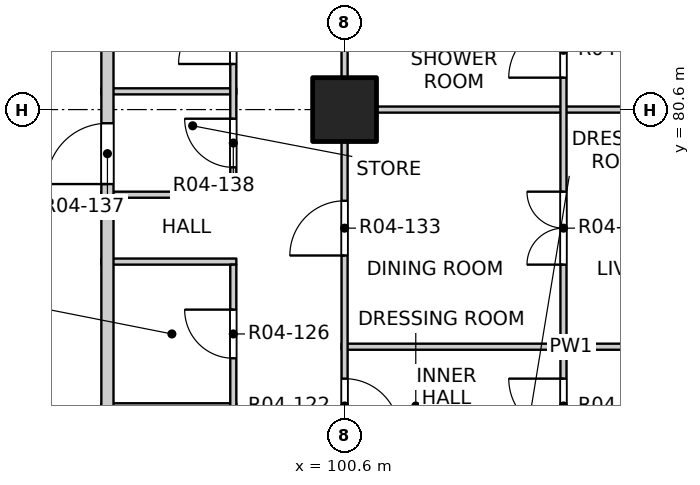
"""IFC4 building model, lengths in metres.
Left out: names, types, materials, properties, quantities, classifications, styles, units other than length and angle.
Written with IfcOpenShell. Run it as: python <this file> out.ifc"""

import sys

from ifc_helpers import new_model, si_unit, direction, frame, frame_2d, origin, origin_2d, place, context, subcontext, project, spatial, rectangle, extrude, element, fill, save


model = new_model("IFC4")
c1 = context("Model", 3, precision=1e-05, world=origin(), true_north=direction((0.0, 1.0)))
c2 = subcontext(c1, "Body", "Model", "MODEL_VIEW")
j1 = project(units=[si_unit("LENGTHUNIT", "METRE"), si_unit("PLANEANGLEUNIT", "RADIAN")], contexts=[c1])
p1 = place(None, origin())
s1 = spatial("IfcSite", under=j1, at=p1, CompositionType="ELEMENT")
p2 = place(p1, origin())
s2 = spatial("IfcBuilding", under=s1, at=p2, CompositionType="ELEMENT")
p3 = place(p2, frame((0.0, 0.0, 58.0)))
s3 = spatial("IfcBuildingStorey", under=s2, at=p3, CompositionType="ELEMENT", Elevation=58.0)
p4 = place(p3, frame((100.6, 80.6, -0.25), z_axis=(0.0, 0.0, 1.0), x_axis=(1.0, 0.0, 0.0)))
e1 = element("IfcColumn", 1, at=p4, inside=s3, PredefinedType="COLUMN", context=c2, shape_type="SweptSolid", body=[
    extrude(rectangle(XDim=1.05, YDim=1.05, at=origin_2d()), origin(), (0.0, 0.0, 1.0), 3.4),
])
p5 = place(p3, frame((96.6, 75.72, 0.0), z_axis=(0.0, 0.0, 1.0), x_axis=(1.0, 0.0, 0.0)))
e2 = element("IfcWall", 2, at=p5, inside=s3, PredefinedType="PARTITIONING", context=c2, shape_type="SweptSolid", body=[
    extrude(rectangle(XDim=2.22, YDim=0.1, at=frame_2d((1.11, 0.0))), origin(), (0.0, 0.0, 1.0), 3.15),
])
p6 = place(p3, frame((100.55, 76.7, 0.0), z_axis=(0.0, 0.0, 1.0), x_axis=(1.0, 0.0, 0.0)))
e3 = element("IfcWall", 3, at=p6, inside=s3, PredefinedType="PARTITIONING", context=c2, shape_type="SweptSolid", body=[
    extrude(rectangle(XDim=7.55, YDim=0.1, at=frame_2d((3.775, 0.0))), origin(), (0.0, 0.0, 1.0), 3.15),
])
for number, where, z_axis, x_axis in (
    (4, (96.6, 78.1, 0.0), (0.0, 0.0, 1.0), (1.0, 0.0, 0.0)),
    (5, (96.6, 79.2, 0.0), (0.0, 0.0, 1.0), (1.0, 0.0, 0.0)),
):
    element("IfcWall", number, at=place(p3, frame(where, z_axis=z_axis, x_axis=x_axis)), inside=s3, PredefinedType="PARTITIONING", context=c2, shape_type="SweptSolid", body=[
        extrude(rectangle(XDim=2.22, YDim=0.1, at=frame_2d((1.11, 0.0))), origin(), (0.0, 0.0, 1.0), 3.15),
    ])
p7 = place(p3, frame((100.55, 80.6, 0.0), z_axis=(0.0, 0.0, 1.0), x_axis=(1.0, 0.0, 0.0)))
e6 = element("IfcWall", 6, at=p7, inside=s3, PredefinedType="PARTITIONING", context=c2, shape_type="SweptSolid", body=[
    extrude(rectangle(XDim=7.55, YDim=0.1, at=frame_2d((3.775, 0.0))), origin(), (0.0, 0.0, 1.0), 2.55),
])
p8 = place(p3, frame((96.6, 80.9, 0.0), z_axis=(0.0, 0.0, 1.0), x_axis=(1.0, 0.0, 0.0)))
e7 = element("IfcWall", 7, at=p8, inside=s3, PredefinedType="PARTITIONING", context=c2, shape_type="SweptSolid", body=[
    extrude(rectangle(XDim=2.22, YDim=0.1, at=frame_2d((1.11, 0.0))), origin(), (0.0, 0.0, 1.0), 3.15),
])
p9 = place(p3, frame((96.7, 53.4, 0.0), z_axis=(0.0, 0.0, 1.0), x_axis=(0.0, 1.0, 0.0)))
e8 = element("IfcWall", 8, at=p9, inside=s3, PredefinedType="PARTITIONING", context=c2, shape_type="SweptSolid", body=[
    extrude(rectangle(XDim=31.0, YDim=0.2, at=frame_2d((15.5, 0.0))), origin(), (0.0, 0.0, 1.0), 3.15),
])
p10 = place(p9, frame((3.525, 0.0, 0.0)))
e9 = element("IfcOpeningElement", 9, at=p10, cuts=e8, PredefinedType="OPENING", context=c2, shape_type="SweptSolid", body=[
    extrude(rectangle(XDim=1.0, YDim=2.1, at=frame_2d((0.5, 1.05))), frame((0.0, 0.11, 0.0), z_axis=(0.0, -1.0, 0.0), x_axis=(1.0, 0.0, 0.0)), (0.0, 0.0, 1.0), 0.22),
])
p11 = place(p9, frame((10.825, 0.0, 0.0)))
e10 = element("IfcOpeningElement", 10, at=p11, cuts=e8, PredefinedType="OPENING", context=c2, shape_type="SweptSolid", body=[
    extrude(rectangle(XDim=1.0, YDim=2.1, at=frame_2d((0.5, 1.05))), frame((0.0, 0.11, 0.0), z_axis=(0.0, -1.0, 0.0), x_axis=(1.0, 0.0, 0.0)), (0.0, 0.0, 1.0), 0.22),
])
p12 = place(p9, frame((25.975, 0.0, 0.0)))
e11 = element("IfcOpeningElement", 11, at=p12, cuts=e8, PredefinedType="OPENING", context=c2, shape_type="SweptSolid", body=[
    extrude(rectangle(XDim=1.0, YDim=2.1, at=frame_2d((0.5, 1.05))), frame((0.0, 0.11, 0.0), z_axis=(0.0, -1.0, 0.0), x_axis=(1.0, 0.0, 0.0)), (0.0, 0.0, 1.0), 0.22),
])
p13 = place(p3, frame((98.77, 64.1, 0.0), z_axis=(0.0, 0.0, 1.0), x_axis=(0.0, 1.0, 0.0)))
e12 = element("IfcWall", 12, at=p13, inside=s3, PredefinedType="PARTITIONING", context=c2, shape_type="SweptSolid", body=[
    extrude(rectangle(XDim=13.95, YDim=0.1, at=frame_2d((6.975, 0.0))), origin(), (0.0, 0.0, 1.0), 3.15),
])
p14 = place(p13, frame((1.185, 0.0, 0.0)))
e13 = element("IfcOpeningElement", 13, at=p14, cuts=e12, PredefinedType="OPENING", context=c2, shape_type="SweptSolid", body=[
    extrude(rectangle(XDim=0.9, YDim=2.1, at=frame_2d((0.45, 1.05))), frame((0.0, 0.06, 0.0), z_axis=(0.0, -1.0, 0.0), x_axis=(1.0, 0.0, 0.0)), (0.0, 0.0, 1.0), 0.12),
])
p15 = place(p13, frame((4.07, 0.0, 0.0)))
e14 = element("IfcOpeningElement", 14, at=p15, cuts=e12, PredefinedType="OPENING", context=c2, shape_type="SweptSolid", body=[
    extrude(rectangle(XDim=0.9, YDim=2.1, at=frame_2d((0.45, 1.05))), frame((0.0, 0.06, 0.0), z_axis=(0.0, -1.0, 0.0), x_axis=(1.0, 0.0, 0.0)), (0.0, 0.0, 1.0), 0.12),
])
p16 = place(p13, frame((6.81, 0.0, 0.0)))
e15 = element("IfcOpeningElement", 15, at=p16, cuts=e12, PredefinedType="OPENING", context=c2, shape_type="SweptSolid", body=[
    extrude(rectangle(XDim=0.8, YDim=2.1, at=frame_2d((0.4, 1.05))), frame((0.0, 0.06, 0.0), z_axis=(0.0, -1.0, 0.0), x_axis=(1.0, 0.0, 0.0)), (0.0, 0.0, 1.0), 0.12),
])
p17 = place(p13, frame((9.71, 0.0, 0.0)))
e16 = element("IfcOpeningElement", 16, at=p17, cuts=e12, PredefinedType="OPENING", context=c2, shape_type="SweptSolid", body=[
    extrude(rectangle(XDim=0.9, YDim=2.1, at=frame_2d((0.45, 1.05))), frame((0.0, 0.06, 0.0), z_axis=(0.0, -1.0, 0.0), x_axis=(1.0, 0.0, 0.0)), (0.0, 0.0, 1.0), 0.12),
])
p18 = place(p13, frame((12.41, 0.0, 0.0)))
e17 = element("IfcOpeningElement", 17, at=p18, cuts=e12, PredefinedType="OPENING", context=c2, shape_type="SweptSolid", body=[
    extrude(rectangle(XDim=0.8, YDim=2.1, at=frame_2d((0.4, 1.05))), frame((0.0, 0.06, 0.0), z_axis=(0.0, -1.0, 0.0), x_axis=(1.0, 0.0, 0.0)), (0.0, 0.0, 1.0), 0.12),
])
p19 = place(p3, frame((98.77, 79.25, 0.0), z_axis=(0.0, 0.0, 1.0), x_axis=(0.0, 1.0, 0.0)))
e18 = element("IfcWall", 18, at=p19, inside=s3, PredefinedType="PARTITIONING", context=c2, shape_type="SweptSolid", body=[
    extrude(rectangle(XDim=5.2, YDim=0.1, at=frame_2d((2.6, 0.0))), origin(), (0.0, 0.0, 1.0), 3.15),
])
p20 = place(p19, frame((0.4, 0.0, 0.0)))
e19 = element("IfcOpeningElement", 19, at=p20, cuts=e18, PredefinedType="OPENING", context=c2, shape_type="SweptSolid", body=[
    extrude(rectangle(XDim=0.8, YDim=2.1, at=frame_2d((0.4, 1.05))), frame((0.0, 0.06, 0.0), z_axis=(0.0, -1.0, 0.0), x_axis=(1.0, 0.0, 0.0)), (0.0, 0.0, 1.0), 0.12),
])
p21 = place(p19, frame((2.1, 0.0, 0.0)))
e20 = element("IfcOpeningElement", 20, at=p21, cuts=e18, PredefinedType="OPENING", context=c2, shape_type="SweptSolid", body=[
    extrude(rectangle(XDim=0.9, YDim=2.1, at=frame_2d((0.45, 1.05))), frame((0.0, 0.06, 0.0), z_axis=(0.0, -1.0, 0.0), x_axis=(1.0, 0.0, 0.0)), (0.0, 0.0, 1.0), 0.12),
])
p22 = place(p19, frame((3.9, 0.0, 0.0)))
e21 = element("IfcOpeningElement", 21, at=p22, cuts=e18, PredefinedType="OPENING", context=c2, shape_type="SweptSolid", body=[
    extrude(rectangle(XDim=0.9, YDim=2.1, at=frame_2d((0.45, 1.05))), frame((0.0, 0.06, 0.0), z_axis=(0.0, -1.0, 0.0), x_axis=(1.0, 0.0, 0.0)), (0.0, 0.0, 1.0), 0.12),
])
p23 = place(p3, frame((100.6, 49.4, 0.0), z_axis=(0.0, 0.0, 1.0), x_axis=(0.0, 1.0, 0.0)))
e22 = element("IfcWall", 22, at=p23, inside=s3, PredefinedType="PARTITIONING", context=c2, shape_type="SweptSolid", body=[
    extrude(rectangle(XDim=31.2, YDim=0.1, at=frame_2d((15.6, 0.0))), origin(), (0.0, 0.0, 1.0), 3.15),
])
p24 = place(p23, frame((2.475, 0.0, 0.0)))
e23 = element("IfcOpeningElement", 23, at=p24, cuts=e22, PredefinedType="OPENING", context=c2, shape_type="SweptSolid", body=[
    extrude(rectangle(XDim=0.9, YDim=2.1, at=frame_2d((0.45, 1.05))), frame((0.0, 0.06, 0.0), z_axis=(0.0, -1.0, 0.0), x_axis=(1.0, 0.0, 0.0)), (0.0, 0.0, 1.0), 0.12),
])
p25 = place(p23, frame((5.4, 0.0, 0.0)))
e24 = element("IfcOpeningElement", 24, at=p25, cuts=e22, PredefinedType="OPENING", context=c2, shape_type="SweptSolid", body=[
    extrude(rectangle(XDim=0.9, YDim=2.1, at=frame_2d((0.45, 1.05))), frame((0.0, 0.06, 0.0), z_axis=(0.0, -1.0, 0.0), x_axis=(1.0, 0.0, 0.0)), (0.0, 0.0, 1.0), 0.12),
])
p26 = place(p23, frame((10.275, 0.0, 0.0)))
e25 = element("IfcOpeningElement", 25, at=p26, cuts=e22, PredefinedType="OPENING", context=c2, shape_type="SweptSolid", body=[
    extrude(rectangle(XDim=0.9, YDim=2.1, at=frame_2d((0.45, 1.05))), frame((0.0, 0.06, 0.0), z_axis=(0.0, -1.0, 0.0), x_axis=(1.0, 0.0, 0.0)), (0.0, 0.0, 1.0), 0.12),
])
p27 = place(p23, frame((13.2, 0.0, 0.0)))
e26 = element("IfcOpeningElement", 26, at=p27, cuts=e22, PredefinedType="OPENING", context=c2, shape_type="SweptSolid", body=[
    extrude(rectangle(XDim=0.9, YDim=2.1, at=frame_2d((0.45, 1.05))), frame((0.0, 0.06, 0.0), z_axis=(0.0, -1.0, 0.0), x_axis=(1.0, 0.0, 0.0)), (0.0, 0.0, 1.0), 0.12),
])
p28 = place(p23, frame((17.1, 0.0, 0.0)))
e27 = element("IfcOpeningElement", 27, at=p28, cuts=e22, PredefinedType="OPENING", context=c2, shape_type="SweptSolid", body=[
    extrude(rectangle(XDim=0.9, YDim=2.1, at=frame_2d((0.45, 1.05))), frame((0.0, 0.06, 0.0), z_axis=(0.0, -1.0, 0.0), x_axis=(1.0, 0.0, 0.0)), (0.0, 0.0, 1.0), 0.12),
])
p29 = place(p23, frame((21.8, 0.0, 0.0)))
e28 = element("IfcOpeningElement", 28, at=p29, cuts=e22, PredefinedType="OPENING", context=c2, shape_type="SweptSolid", body=[
    extrude(rectangle(XDim=0.9, YDim=2.1, at=frame_2d((0.45, 1.05))), frame((0.0, 0.06, 0.0), z_axis=(0.0, -1.0, 0.0), x_axis=(1.0, 0.0, 0.0)), (0.0, 0.0, 1.0), 0.12),
])
p30 = place(p23, frame((25.875, 0.0, 0.0)))
e29 = element("IfcOpeningElement", 29, at=p30, cuts=e22, PredefinedType="OPENING", context=c2, shape_type="SweptSolid", body=[
    extrude(rectangle(XDim=0.9, YDim=2.1, at=frame_2d((0.45, 1.05))), frame((0.0, 0.06, 0.0), z_axis=(0.0, -1.0, 0.0), x_axis=(1.0, 0.0, 0.0)), (0.0, 0.0, 1.0), 0.12),
])
p31 = place(p23, frame((28.8, 0.0, 0.0)))
e30 = element("IfcOpeningElement", 30, at=p31, cuts=e22, PredefinedType="OPENING", context=c2, shape_type="SweptSolid", body=[
    extrude(rectangle(XDim=0.9, YDim=2.1, at=frame_2d((0.45, 1.05))), frame((0.0, 0.06, 0.0), z_axis=(0.0, -1.0, 0.0), x_axis=(1.0, 0.0, 0.0)), (0.0, 0.0, 1.0), 0.12),
])
p32 = place(p3, frame((100.6, 80.6, 0.0), z_axis=(0.0, 0.0, 1.0), x_axis=(0.0, 1.0, 0.0)))
e31 = element("IfcWall", 31, at=p32, inside=s3, PredefinedType="PARTITIONING", context=c2, shape_type="SweptSolid", body=[
    extrude(rectangle(XDim=7.5, YDim=0.1, at=frame_2d((3.75, 0.0))), origin(), (0.0, 0.0, 1.0), 2.55),
])
p33 = place(p32, frame((2.475, 0.0, 0.0)))
e32 = element("IfcOpeningElement", 32, at=p33, cuts=e31, PredefinedType="OPENING", context=c2, shape_type="SweptSolid", body=[
    extrude(rectangle(XDim=0.9, YDim=2.1, at=frame_2d((0.45, 1.05))), frame((0.0, 0.06, 0.0), z_axis=(0.0, -1.0, 0.0), x_axis=(1.0, 0.0, 0.0)), (0.0, 0.0, 1.0), 0.12),
])
p34 = place(p32, frame((5.4, 0.0, 0.0)))
e33 = element("IfcOpeningElement", 33, at=p34, cuts=e31, PredefinedType="OPENING", context=c2, shape_type="SweptSolid", body=[
    extrude(rectangle(XDim=0.9, YDim=2.1, at=frame_2d((0.45, 1.05))), frame((0.0, 0.06, 0.0), z_axis=(0.0, -1.0, 0.0), x_axis=(1.0, 0.0, 0.0)), (0.0, 0.0, 1.0), 0.12),
])
p35 = place(p3, frame((104.2, 41.9, 0.0), z_axis=(0.0, 0.0, 1.0), x_axis=(0.0, 1.0, 0.0)))
e34 = element("IfcWall", 34, at=p35, inside=s3, PredefinedType="PARTITIONING", context=c2, shape_type="SweptSolid", body=[
    extrude(rectangle(XDim=46.2, YDim=0.1, at=frame_2d((23.1, 0.0))), origin(), (0.0, 0.0, 1.0), 3.15),
])
p36 = place(p35, frame((1.05, 0.0, 0.0)))
e35 = element("IfcOpeningElement", 35, at=p36, cuts=e34, PredefinedType="OPENING", context=c2, shape_type="SweptSolid", body=[
    extrude(rectangle(XDim=1.2, YDim=2.1, at=frame_2d((0.6, 1.05))), frame((0.0, 0.06, 0.0), z_axis=(0.0, -1.0, 0.0), x_axis=(1.0, 0.0, 0.0)), (0.0, 0.0, 1.0), 0.12),
])
p37 = place(p35, frame((4.125, 0.0, 0.0)))
e36 = element("IfcOpeningElement", 36, at=p37, cuts=e34, PredefinedType="OPENING", context=c2, shape_type="SweptSolid", body=[
    extrude(rectangle(XDim=0.9, YDim=2.1, at=frame_2d((0.45, 1.05))), frame((0.0, 0.06, 0.0), z_axis=(0.0, -1.0, 0.0), x_axis=(1.0, 0.0, 0.0)), (0.0, 0.0, 1.0), 0.12),
])
p38 = place(p35, frame((6.075, 0.0, 0.0)))
e37 = element("IfcOpeningElement", 37, at=p38, cuts=e34, PredefinedType="OPENING", context=c2, shape_type="SweptSolid", body=[
    extrude(rectangle(XDim=0.9, YDim=2.1, at=frame_2d((0.45, 1.05))), frame((0.0, 0.06, 0.0), z_axis=(0.0, -1.0, 0.0), x_axis=(1.0, 0.0, 0.0)), (0.0, 0.0, 1.0), 0.12),
])
p39 = place(p35, frame((8.025, 0.0, 0.0)))
e38 = element("IfcOpeningElement", 38, at=p39, cuts=e34, PredefinedType="OPENING", context=c2, shape_type="SweptSolid", body=[
    extrude(rectangle(XDim=0.9, YDim=2.1, at=frame_2d((0.45, 1.05))), frame((0.0, 0.06, 0.0), z_axis=(0.0, -1.0, 0.0), x_axis=(1.0, 0.0, 0.0)), (0.0, 0.0, 1.0), 0.12),
])
p40 = place(p35, frame((9.975, 0.0, 0.0)))
e39 = element("IfcOpeningElement", 39, at=p40, cuts=e34, PredefinedType="OPENING", context=c2, shape_type="SweptSolid", body=[
    extrude(rectangle(XDim=0.9, YDim=2.1, at=frame_2d((0.45, 1.05))), frame((0.0, 0.06, 0.0), z_axis=(0.0, -1.0, 0.0), x_axis=(1.0, 0.0, 0.0)), (0.0, 0.0, 1.0), 0.12),
])
p41 = place(p35, frame((12.75, 0.0, 0.0)))
e40 = element("IfcOpeningElement", 40, at=p41, cuts=e34, PredefinedType="OPENING", context=c2, shape_type="SweptSolid", body=[
    extrude(rectangle(XDim=1.2, YDim=2.1, at=frame_2d((0.6, 1.05))), frame((0.0, 0.06, 0.0), z_axis=(0.0, -1.0, 0.0), x_axis=(1.0, 0.0, 0.0)), (0.0, 0.0, 1.0), 0.12),
])
p42 = place(p35, frame((15.825, 0.0, 0.0)))
e41 = element("IfcOpeningElement", 41, at=p42, cuts=e34, PredefinedType="OPENING", context=c2, shape_type="SweptSolid", body=[
    extrude(rectangle(XDim=0.9, YDim=2.1, at=frame_2d((0.45, 1.05))), frame((0.0, 0.06, 0.0), z_axis=(0.0, -1.0, 0.0), x_axis=(1.0, 0.0, 0.0)), (0.0, 0.0, 1.0), 0.12),
])
p43 = place(p35, frame((17.775, 0.0, 0.0)))
e42 = element("IfcOpeningElement", 42, at=p43, cuts=e34, PredefinedType="OPENING", context=c2, shape_type="SweptSolid", body=[
    extrude(rectangle(XDim=0.9, YDim=2.1, at=frame_2d((0.45, 1.05))), frame((0.0, 0.06, 0.0), z_axis=(0.0, -1.0, 0.0), x_axis=(1.0, 0.0, 0.0)), (0.0, 0.0, 1.0), 0.12),
])
p44 = place(p35, frame((20.55, 0.0, 0.0)))
e43 = element("IfcOpeningElement", 43, at=p44, cuts=e34, PredefinedType="OPENING", context=c2, shape_type="SweptSolid", body=[
    extrude(rectangle(XDim=1.2, YDim=2.1, at=frame_2d((0.6, 1.05))), frame((0.0, 0.06, 0.0), z_axis=(0.0, -1.0, 0.0), x_axis=(1.0, 0.0, 0.0)), (0.0, 0.0, 1.0), 0.12),
])
p45 = place(p35, frame((24.45, 0.0, 0.0)))
e44 = element("IfcOpeningElement", 44, at=p45, cuts=e34, PredefinedType="OPENING", context=c2, shape_type="SweptSolid", body=[
    extrude(rectangle(XDim=1.2, YDim=2.1, at=frame_2d((0.6, 1.05))), frame((0.0, 0.06, 0.0), z_axis=(0.0, -1.0, 0.0), x_axis=(1.0, 0.0, 0.0)), (0.0, 0.0, 1.0), 0.12),
])
p46 = place(p35, frame((27.525, 0.0, 0.0)))
e45 = element("IfcOpeningElement", 45, at=p46, cuts=e34, PredefinedType="OPENING", context=c2, shape_type="SweptSolid", body=[
    extrude(rectangle(XDim=0.9, YDim=2.1, at=frame_2d((0.45, 1.05))), frame((0.0, 0.06, 0.0), z_axis=(0.0, -1.0, 0.0), x_axis=(1.0, 0.0, 0.0)), (0.0, 0.0, 1.0), 0.12),
])
p47 = place(p35, frame((29.475, 0.0, 0.0)))
e46 = element("IfcOpeningElement", 46, at=p47, cuts=e34, PredefinedType="OPENING", context=c2, shape_type="SweptSolid", body=[
    extrude(rectangle(XDim=0.9, YDim=2.1, at=frame_2d((0.45, 1.05))), frame((0.0, 0.06, 0.0), z_axis=(0.0, -1.0, 0.0), x_axis=(1.0, 0.0, 0.0)), (0.0, 0.0, 1.0), 0.12),
])
p48 = place(p35, frame((31.425, 0.0, 0.0)))
e47 = element("IfcOpeningElement", 47, at=p48, cuts=e34, PredefinedType="OPENING", context=c2, shape_type="SweptSolid", body=[
    extrude(rectangle(XDim=0.9, YDim=2.1, at=frame_2d((0.45, 1.05))), frame((0.0, 0.06, 0.0), z_axis=(0.0, -1.0, 0.0), x_axis=(1.0, 0.0, 0.0)), (0.0, 0.0, 1.0), 0.12),
])
p49 = place(p35, frame((33.375, 0.0, 0.0)))
e48 = element("IfcOpeningElement", 48, at=p49, cuts=e34, PredefinedType="OPENING", context=c2, shape_type="SweptSolid", body=[
    extrude(rectangle(XDim=0.9, YDim=2.1, at=frame_2d((0.45, 1.05))), frame((0.0, 0.06, 0.0), z_axis=(0.0, -1.0, 0.0), x_axis=(1.0, 0.0, 0.0)), (0.0, 0.0, 1.0), 0.12),
])
p50 = place(p35, frame((36.15, 0.0, 0.0)))
e49 = element("IfcOpeningElement", 49, at=p50, cuts=e34, PredefinedType="OPENING", context=c2, shape_type="SweptSolid", body=[
    extrude(rectangle(XDim=1.2, YDim=2.1, at=frame_2d((0.6, 1.05))), frame((0.0, 0.06, 0.0), z_axis=(0.0, -1.0, 0.0), x_axis=(1.0, 0.0, 0.0)), (0.0, 0.0, 1.0), 0.12),
])
p51 = place(p35, frame((39.225, 0.0, 0.0)))
e50 = element("IfcOpeningElement", 50, at=p51, cuts=e34, PredefinedType="OPENING", context=c2, shape_type="SweptSolid", body=[
    extrude(rectangle(XDim=0.9, YDim=2.1, at=frame_2d((0.45, 1.05))), frame((0.0, 0.06, 0.0), z_axis=(0.0, -1.0, 0.0), x_axis=(1.0, 0.0, 0.0)), (0.0, 0.0, 1.0), 0.12),
])
p52 = place(p35, frame((41.175, 0.0, 0.0)))
e51 = element("IfcOpeningElement", 51, at=p52, cuts=e34, PredefinedType="OPENING", context=c2, shape_type="SweptSolid", body=[
    extrude(rectangle(XDim=0.9, YDim=2.1, at=frame_2d((0.45, 1.05))), frame((0.0, 0.06, 0.0), z_axis=(0.0, -1.0, 0.0), x_axis=(1.0, 0.0, 0.0)), (0.0, 0.0, 1.0), 0.12),
])
p53 = place(p35, frame((43.95, 0.0, 0.0)))
e52 = element("IfcOpeningElement", 52, at=p53, cuts=e34, PredefinedType="OPENING", context=c2, shape_type="SweptSolid", body=[
    extrude(rectangle(XDim=1.2, YDim=2.1, at=frame_2d((0.6, 1.05))), frame((0.0, 0.06, 0.0), z_axis=(0.0, -1.0, 0.0), x_axis=(1.0, 0.0, 0.0)), (0.0, 0.0, 1.0), 0.12),
])
p54 = place(p30, origin())
e53 = element("IfcDoor", 53, at=p54, inside=s3, OperationType="SINGLE_SWING_RIGHT", PredefinedType="DOOR", context=c2, shape_type="SweptSolid", body=[
    extrude(rectangle(XDim=0.9, YDim=2.1, at=frame_2d((0.45, 1.05))), frame((0.0, 0.025, 0.0), z_axis=(0.0, -1.0, 0.0), x_axis=(1.0, 0.0, 0.0)), (0.0, 0.0, 1.0), 0.05),
])
fill(e29, e53)
p55 = place(p49, origin())
e54 = element("IfcDoor", 54, at=p55, inside=s3, OperationType="SINGLE_SWING_RIGHT", PredefinedType="DOOR", context=c2, shape_type="SweptSolid", body=[
    extrude(rectangle(XDim=0.9, YDim=2.1, at=frame_2d((0.45, 1.05))), frame((0.0, 0.025, 0.0), z_axis=(0.0, -1.0, 0.0), x_axis=(1.0, 0.0, 0.0)), (0.0, 0.0, 1.0), 0.05),
])
fill(e48, e54)
p56 = place(p18, origin())
e55 = element("IfcDoor", 55, at=p56, inside=s3, OperationType="SINGLE_SWING_RIGHT", PredefinedType="DOOR", context=c2, shape_type="SweptSolid", body=[
    extrude(rectangle(XDim=0.8, YDim=2.1, at=frame_2d((0.4, 1.05))), frame((0.0, 0.025, 0.0), z_axis=(0.0, -1.0, 0.0), x_axis=(1.0, 0.0, 0.0)), (0.0, 0.0, 1.0), 0.05),
])
fill(e17, e55)
p57 = place(p31, origin())
e56 = element("IfcDoor", 56, at=p57, inside=s3, OperationType="SINGLE_SWING_LEFT", PredefinedType="DOOR", context=c2, shape_type="SweptSolid", body=[
    extrude(rectangle(XDim=0.9, YDim=2.1, at=frame_2d((0.45, 1.05))), frame((0.0, 0.025, 0.0), z_axis=(0.0, -1.0, 0.0), x_axis=(1.0, 0.0, 0.0)), (0.0, 0.0, 1.0), 0.05),
])
fill(e30, e56)
p58 = place(p50, origin())
e57 = element("IfcDoor", 57, at=p58, inside=s3, OperationType="DOUBLE_DOOR_SINGLE_SWING", PredefinedType="DOOR", context=c2, shape_type="SweptSolid", body=[
    extrude(rectangle(XDim=1.2, YDim=2.1, at=frame_2d((0.6, 1.05))), frame((0.0, 0.025, 0.0), z_axis=(0.0, -1.0, 0.0), x_axis=(1.0, 0.0, 0.0)), (0.0, 0.0, 1.0), 0.05),
])
fill(e49, e57)
p59 = place(p12, origin())
e58 = element("IfcDoor", 58, at=p59, inside=s3, OperationType="SINGLE_SWING_LEFT", PredefinedType="DOOR", context=c2, shape_type="SweptSolid", body=[
    extrude(rectangle(XDim=1.0, YDim=2.1, at=frame_2d((0.5, 1.05))), frame((0.0, 0.025, 0.0), z_axis=(0.0, -1.0, 0.0), x_axis=(1.0, 0.0, 0.0)), (0.0, 0.0, 1.0), 0.05),
])
fill(e11, e58)
p60 = place(p20, origin())
e59 = element("IfcDoor", 59, at=p60, inside=s3, OperationType="SINGLE_SWING_RIGHT", PredefinedType="DOOR", context=c2, shape_type="SweptSolid", body=[
    extrude(rectangle(XDim=0.8, YDim=2.1, at=frame_2d((0.4, 1.05))), frame((0.0, 0.025, 0.0), z_axis=(0.0, -1.0, 0.0), x_axis=(1.0, 0.0, 0.0)), (0.0, 0.0, 1.0), 0.05),
])
fill(e19, e59)
p61 = place(p51, origin())
e60 = element("IfcDoor", 60, at=p61, inside=s3, OperationType="SINGLE_SWING_LEFT", PredefinedType="DOOR", context=c2, shape_type="SweptSolid", body=[
    extrude(rectangle(XDim=0.9, YDim=2.1, at=frame_2d((0.45, 1.05))), frame((0.0, 0.025, 0.0), z_axis=(0.0, -1.0, 0.0), x_axis=(1.0, 0.0, 0.0)), (0.0, 0.0, 1.0), 0.05),
])
fill(e50, e60)
p62 = place(p21, origin())
e61 = element("IfcDoor", 61, at=p62, inside=s3, OperationType="SINGLE_SWING_LEFT", PredefinedType="DOOR", context=c2, shape_type="SweptSolid", body=[
    extrude(rectangle(XDim=0.9, YDim=2.1, at=frame_2d((0.45, 1.05))), frame((0.0, 0.025, 0.0), z_axis=(0.0, -1.0, 0.0), x_axis=(1.0, 0.0, 0.0)), (0.0, 0.0, 1.0), 0.05),
])
fill(e20, e61)
save(model, sys.argv[1])
